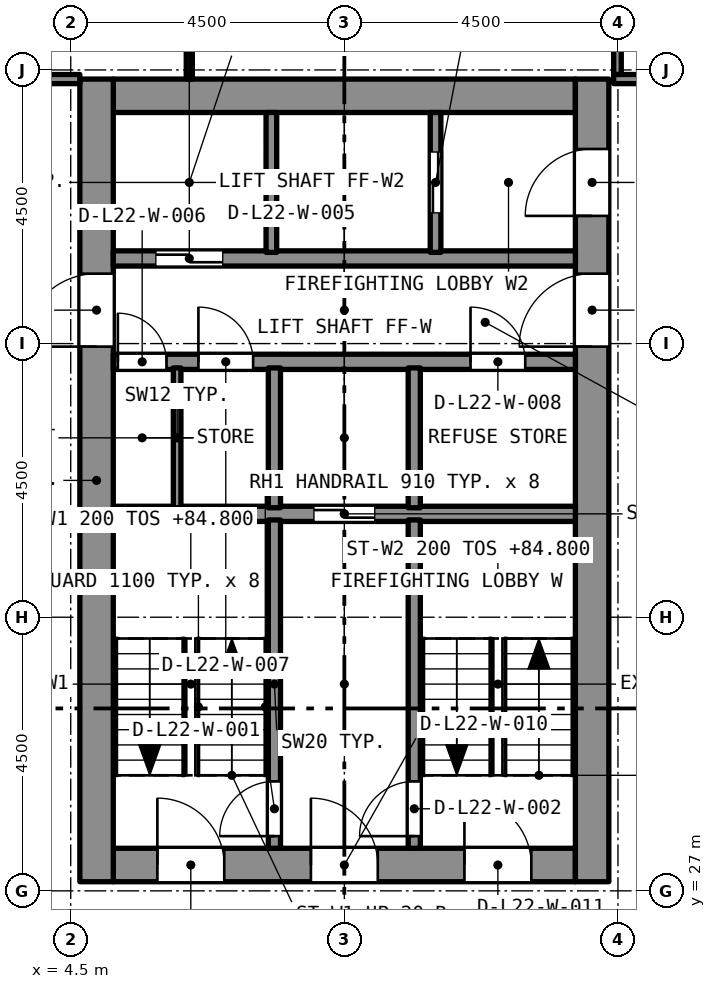
"""IFC4 building model, lengths in metres.
Left out: names, types, materials, properties, quantities, classifications, styles, units other than length and angle.
Written with IfcOpenShell. Run it as: python <this file> out.ifc"""

import sys

from ifc_helpers import new_model, si_unit, direction, frame, frame_2d, origin, place, context, subcontext, project, spatial, rectangle, extrude, element, fill, save


model = new_model("IFC4")
c1 = context("Model", 3, precision=1e-05, world=origin(), true_north=direction((0.0, 1.0)))
c2 = subcontext(c1, "Body", "Model", "MODEL_VIEW")
j1 = project(units=[si_unit("LENGTHUNIT", "METRE"), si_unit("PLANEANGLEUNIT", "RADIAN")], contexts=[c1])
p1 = place(None, origin())
s1 = spatial("IfcSite", under=j1, at=p1, CompositionType="ELEMENT")
p2 = place(p1, origin())
s2 = spatial("IfcBuilding", under=s1, at=p2, CompositionType="ELEMENT")
p3 = place(p2, frame((0.0, 0.0, 83.2)))
s3 = spatial("IfcBuildingStorey", under=s2, at=p3, CompositionType="ELEMENT", Elevation=83.2)
p4 = place(p3, frame((5.2, 27.425, 0.0), z_axis=(0.0, 0.0, 1.0), x_axis=(1.0, 0.0, 0.0)))
e1 = element("IfcWall", 1, at=p4, inside=s3, PredefinedType="SOLIDWALL", context=c2, shape_type="SweptSolid", body=[
    extrude(rectangle(XDim=7.6, YDim=0.55, at=frame_2d((3.8, 0.0))), origin(), (0.0, 0.0, 1.0), 3.2),
])
p5 = place(p4, frame((0.725, 0.0, 0.0)))
e2 = element("IfcOpeningElement", 2, at=p5, cuts=e1, PredefinedType="OPENING", context=c2, shape_type="SweptSolid", body=[
    extrude(rectangle(XDim=1.1, YDim=2.1, at=frame_2d((0.55, 1.05))), frame((0.0, 0.285, 0.0), z_axis=(0.0, -1.0, 0.0), x_axis=(1.0, 0.0, 0.0)), (0.0, 0.0, 1.0), 0.57),
])
p6 = place(p4, frame((3.25, 0.0, 0.0)))
e3 = element("IfcOpeningElement", 3, at=p6, cuts=e1, PredefinedType="OPENING", context=c2, shape_type="SweptSolid", body=[
    extrude(rectangle(XDim=1.1, YDim=2.1, at=frame_2d((0.55, 1.05))), frame((0.0, 0.285, 0.0), z_axis=(0.0, -1.0, 0.0), x_axis=(1.0, 0.0, 0.0)), (0.0, 0.0, 1.0), 0.57),
])
p7 = place(p4, frame((5.775, 0.0, 0.0)))
e4 = element("IfcOpeningElement", 4, at=p7, cuts=e1, PredefinedType="OPENING", context=c2, shape_type="SweptSolid", body=[
    extrude(rectangle(XDim=1.1, YDim=2.1, at=frame_2d((0.55, 1.05))), frame((0.0, 0.285, 0.0), z_axis=(0.0, -1.0, 0.0), x_axis=(1.0, 0.0, 0.0)), (0.0, 0.0, 1.0), 0.57),
])
p8 = place(p3, frame((5.2, 40.075, 0.0), z_axis=(0.0, 0.0, 1.0), x_axis=(1.0, 0.0, 0.0)))
e5 = element("IfcWall", 5, at=p8, inside=s3, PredefinedType="SOLIDWALL", context=c2, shape_type="SweptSolid", body=[
    extrude(rectangle(XDim=7.6, YDim=0.55, at=frame_2d((3.8, 0.0))), origin(), (0.0, 0.0, 1.0), 3.2),
])
p9 = place(p3, frame((4.925, 27.15, 0.0), z_axis=(0.0, 0.0, 1.0), x_axis=(0.0, 1.0, 0.0)))
e6 = element("IfcWall", 6, at=p9, inside=s3, PredefinedType="SOLIDWALL", context=c2, shape_type="SweptSolid", body=[
    extrude(rectangle(XDim=13.2, YDim=0.55, at=frame_2d((6.6, 0.0))), origin(), (0.0, 0.0, 1.0), 3.2),
])
p10 = place(p9, frame((8.8, 0.0, 0.0)))
e7 = element("IfcOpeningElement", 7, at=p10, cuts=e6, PredefinedType="OPENING", context=c2, shape_type="SweptSolid", body=[
    extrude(rectangle(XDim=1.2, YDim=2.1, at=frame_2d((0.6, 1.05))), frame((0.0, 0.285, 0.0), z_axis=(0.0, -1.0, 0.0), x_axis=(1.0, 0.0, 0.0)), (0.0, 0.0, 1.0), 0.57),
])
p11 = place(p3, frame((13.075, 27.15, 0.0), z_axis=(0.0, 0.0, 1.0), x_axis=(0.0, 1.0, 0.0)))
e8 = element("IfcWall", 8, at=p11, inside=s3, PredefinedType="SOLIDWALL", context=c2, shape_type="SweptSolid", body=[
    extrude(rectangle(XDim=13.2, YDim=0.55, at=frame_2d((6.6, 0.0))), origin(), (0.0, 0.0, 1.0), 3.2),
])
p12 = place(p11, frame((10.95, 0.0, 0.0)))
e9 = element("IfcOpeningElement", 9, at=p12, cuts=e8, PredefinedType="OPENING", context=c2, shape_type="SweptSolid", body=[
    extrude(rectangle(XDim=1.1, YDim=2.1, at=frame_2d((0.55, 1.05))), frame((0.0, 0.285, 0.0), z_axis=(0.0, -1.0, 0.0), x_axis=(1.0, 0.0, 0.0)), (0.0, 0.0, 1.0), 0.57),
])
p13 = place(p11, frame((8.8, 0.0, 0.0)))
e10 = element("IfcOpeningElement", 10, at=p13, cuts=e8, PredefinedType="OPENING", context=c2, shape_type="SweptSolid", body=[
    extrude(rectangle(XDim=1.2, YDim=2.1, at=frame_2d((0.6, 1.05))), frame((0.0, 0.285, 0.0), z_axis=(0.0, -1.0, 0.0), x_axis=(1.0, 0.0, 0.0)), (0.0, 0.0, 1.0), 0.57),
])
p14 = place(p3, frame((13.492, 40.425, 0.0), z_axis=(0.0, 0.0, 1.0), x_axis=(0.0, 1.0, 0.0)))
e11 = element("IfcWall", 11, at=p14, inside=s3, PredefinedType="PARTITIONING", context=c2, shape_type="SweptSolid", body=[
    extrude(rectangle(XDim=3.133, YDim=0.125, at=frame_2d((1.566, 0.0))), origin(), (0.0, 0.0, 1.0), 2.9),
])
p15 = place(p3, frame((13.429, 40.35, 0.0), z_axis=(0.0, 0.0, 1.0), x_axis=(1.0, 0.0, 0.0)))
e12 = element("IfcWall", 12, at=p15, inside=s3, PredefinedType="PARTITIONING", context=c2, shape_type="SweptSolid", body=[
    extrude(rectangle(XDim=3.996, YDim=0.15, at=frame_2d((1.998, 0.0))), origin(), (0.0, 0.0, 1.0), 2.9),
])
p16 = place(p3, frame((6.45, 40.35, 0.0), z_axis=(0.0, 0.0, 1.0), x_axis=(0.0, 1.0, 0.0)))
e13 = element("IfcWall", 13, at=p16, inside=s3, PredefinedType="PARTITIONING", context=c2, shape_type="SweptSolid", body=[
    extrude(rectangle(XDim=3.22, YDim=0.1, at=frame_2d((1.61, 0.0))), origin(), (0.0, 0.0, 1.0), 2.9),
])
p17 = place(p3, frame((0.575, 40.35, 0.0), z_axis=(0.0, 0.0, 1.0), x_axis=(1.0, 0.0, 0.0)))
e14 = element("IfcWall", 14, at=p17, inside=s3, PredefinedType="PARTITIONING", context=c2, shape_type="SweptSolid", body=[
    extrude(rectangle(XDim=4.075, YDim=0.15, at=frame_2d((2.038, 0.0))), origin(), (0.0, 0.0, 1.0), 2.9),
])
p18 = place(p17, frame((1.175, 0.0, 0.0)))
e15 = element("IfcOpeningElement", 15, at=p18, cuts=e14, PredefinedType="OPENING", context=c2, shape_type="SweptSolid", body=[
    extrude(rectangle(XDim=1.0, YDim=2.1, at=frame_2d((0.5, 1.05))), frame((0.0, 0.085, 0.0), z_axis=(0.0, -1.0, 0.0), x_axis=(1.0, 0.0, 0.0)), (0.0, 0.0, 1.0), 0.17),
])
p19 = place(p3, frame((5.2, 33.2, 0.0), z_axis=(0.0, 0.0, 1.0), x_axis=(1.0, 0.0, 0.0)))
e16 = element("IfcWall", 16, at=p19, inside=s3, PredefinedType="SOLIDWALL", context=c2, shape_type="SweptSolid", body=[
    extrude(rectangle(XDim=7.6, YDim=0.25, at=frame_2d((3.8, 0.0))), origin(), (0.0, 0.0, 1.0), 2.9),
])
p20 = place(p19, frame((3.3, 0.0, 0.0)))
e17 = element("IfcOpeningElement", 17, at=p20, cuts=e16, PredefinedType="OPENING", context=c2, shape_type="SweptSolid", body=[
    extrude(rectangle(XDim=1.0, YDim=2.1, at=frame_2d((0.5, 1.05))), frame((0.0, 0.135, 0.0), z_axis=(0.0, -1.0, 0.0), x_axis=(1.0, 0.0, 0.0)), (0.0, 0.0, 1.0), 0.27),
])
p21 = place(p3, frame((5.2, 35.7, 0.0), z_axis=(0.0, 0.0, 1.0), x_axis=(1.0, 0.0, 0.0)))
e18 = element("IfcWall", 18, at=p21, inside=s3, PredefinedType="SOLIDWALL", context=c2, shape_type="SweptSolid", body=[
    extrude(rectangle(XDim=7.6, YDim=0.25, at=frame_2d((3.8, 0.0))), origin(), (0.0, 0.0, 1.0), 2.9),
])
p22 = place(p21, frame((0.075, 0.0, 0.0)))
e19 = element("IfcOpeningElement", 19, at=p22, cuts=e18, PredefinedType="OPENING", context=c2, shape_type="SweptSolid", body=[
    extrude(rectangle(XDim=0.8, YDim=2.1, at=frame_2d((0.4, 1.05))), frame((0.0, 0.135, 0.0), z_axis=(0.0, -1.0, 0.0), x_axis=(1.0, 0.0, 0.0)), (0.0, 0.0, 1.0), 0.27),
])
p23 = place(p21, frame((1.4, 0.0, 0.0)))
e20 = element("IfcOpeningElement", 20, at=p23, cuts=e18, PredefinedType="OPENING", context=c2, shape_type="SweptSolid", body=[
    extrude(rectangle(XDim=0.9, YDim=2.1, at=frame_2d((0.45, 1.05))), frame((0.0, 0.135, 0.0), z_axis=(0.0, -1.0, 0.0), x_axis=(1.0, 0.0, 0.0)), (0.0, 0.0, 1.0), 0.27),
])
p24 = place(p21, frame((5.875, 0.0, 0.0)))
e21 = element("IfcOpeningElement", 21, at=p24, cuts=e18, PredefinedType="OPENING", context=c2, shape_type="SweptSolid", body=[
    extrude(rectangle(XDim=0.9, YDim=2.1, at=frame_2d((0.45, 1.05))), frame((0.0, 0.135, 0.0), z_axis=(0.0, -1.0, 0.0), x_axis=(1.0, 0.0, 0.0)), (0.0, 0.0, 1.0), 0.27),
])
p25 = place(p3, frame((5.2, 37.4, 0.0), z_axis=(0.0, 0.0, 1.0), x_axis=(1.0, 0.0, 0.0)))
e22 = element("IfcWall", 22, at=p25, inside=s3, PredefinedType="SOLIDWALL", context=c2, shape_type="SweptSolid", body=[
    extrude(rectangle(XDim=7.6, YDim=0.25, at=frame_2d((3.8, 0.0))), origin(), (0.0, 0.0, 1.0), 2.9),
])
p26 = place(p25, frame((0.7, 0.0, 0.0)))
e23 = element("IfcOpeningElement", 23, at=p26, cuts=e22, PredefinedType="OPENING", context=c2, shape_type="SweptSolid", body=[
    extrude(rectangle(XDim=1.1, YDim=2.4, at=frame_2d((0.55, 1.2))), frame((0.0, 0.135, 0.0), z_axis=(0.0, -1.0, 0.0), x_axis=(1.0, 0.0, 0.0)), (0.0, 0.0, 1.0), 0.27),
])
p27 = place(p3, frame((7.85, 27.7, 0.0), z_axis=(0.0, 0.0, 1.0), x_axis=(0.0, 1.0, 0.0)))
e24 = element("IfcWall", 24, at=p27, inside=s3, PredefinedType="SOLIDWALL", context=c2, shape_type="SweptSolid", body=[
    extrude(rectangle(XDim=5.4, YDim=0.2, at=frame_2d((2.7, 0.0))), origin(), (0.0, 0.0, 1.0), 2.9),
])
p28 = place(p27, frame((0.2, 0.0, 0.0)))
e25 = element("IfcOpeningElement", 25, at=p28, cuts=e24, PredefinedType="OPENING", context=c2, shape_type="SweptSolid", body=[
    extrude(rectangle(XDim=0.9, YDim=2.1, at=frame_2d((0.45, 1.05))), frame((0.0, 0.11, 0.0), z_axis=(0.0, -1.0, 0.0), x_axis=(1.0, 0.0, 0.0)), (0.0, 0.0, 1.0), 0.22),
])
p29 = place(p3, frame((10.15, 27.7, 0.0), z_axis=(0.0, 0.0, 1.0), x_axis=(0.0, 1.0, 0.0)))
e26 = element("IfcWall", 26, at=p29, inside=s3, PredefinedType="SOLIDWALL", context=c2, shape_type="SweptSolid", body=[
    extrude(rectangle(XDim=5.4, YDim=0.2, at=frame_2d((2.7, 0.0))), origin(), (0.0, 0.0, 1.0), 2.9),
])
p30 = place(p29, frame((0.2, 0.0, 0.0)))
e27 = element("IfcOpeningElement", 27, at=p30, cuts=e26, PredefinedType="OPENING", context=c2, shape_type="SweptSolid", body=[
    extrude(rectangle(XDim=0.9, YDim=2.1, at=frame_2d((0.45, 1.05))), frame((0.0, 0.11, 0.0), z_axis=(0.0, -1.0, 0.0), x_axis=(1.0, 0.0, 0.0)), (0.0, 0.0, 1.0), 0.22),
])
for number, where, z_axis, x_axis in (
    (28, (7.85, 33.3, 0.0), (0.0, 0.0, 1.0), (0.0, 1.0, 0.0)),
    (29, (10.15, 33.3, 0.0), (0.0, 0.0, 1.0), (0.0, 1.0, 0.0)),
):
    element("IfcWall", number, at=place(p3, frame(where, z_axis=z_axis, x_axis=x_axis)), inside=s3, PredefinedType="SOLIDWALL", context=c2, shape_type="SweptSolid", body=[
        extrude(rectangle(XDim=2.3, YDim=0.2, at=frame_2d((1.15, 0.0))), origin(), (0.0, 0.0, 1.0), 2.9),
    ])
p31 = place(p3, frame((7.8, 37.5, 0.0), z_axis=(0.0, 0.0, 1.0), x_axis=(0.0, 1.0, 0.0)))
e30 = element("IfcWall", 30, at=p31, inside=s3, PredefinedType="SOLIDWALL", context=c2, shape_type="SweptSolid", body=[
    extrude(rectangle(XDim=2.3, YDim=0.175, at=frame_2d((1.15, 0.0))), origin(), (0.0, 0.0, 1.0), 2.9),
])
p32 = place(p3, frame((10.5, 37.5, 0.0), z_axis=(0.0, 0.0, 1.0), x_axis=(0.0, 1.0, 0.0)))
e31 = element("IfcWall", 31, at=p32, inside=s3, PredefinedType="SOLIDWALL", context=c2, shape_type="SweptSolid", body=[
    extrude(rectangle(XDim=2.3, YDim=0.175, at=frame_2d((1.15, 0.0))), origin(), (0.0, 0.0, 1.0), 2.9),
])
p33 = place(p32, frame((0.65, 0.0, 0.0)))
e32 = element("IfcOpeningElement", 32, at=p33, cuts=e31, PredefinedType="OPENING", context=c2, shape_type="SweptSolid", body=[
    extrude(rectangle(XDim=1.0, YDim=2.1, at=frame_2d((0.5, 1.05))), frame((0.0, 0.097, 0.0), z_axis=(0.0, -1.0, 0.0), x_axis=(1.0, 0.0, 0.0)), (0.0, 0.0, 1.0), 0.195),
])
p34 = place(p3, frame((6.25, 33.3, 0.0), z_axis=(0.0, 0.0, 1.0), x_axis=(0.0, 1.0, 0.0)))
e33 = element("IfcWall", 33, at=p34, inside=s3, PredefinedType="PARTITIONING", context=c2, shape_type="SweptSolid", body=[
    extrude(rectangle(XDim=2.3, YDim=0.125, at=frame_2d((1.15, 0.0))), origin(), (0.0, 0.0, 1.0), 2.9),
])
p35 = place(p28, origin())
e34 = element("IfcDoor", 34, at=p35, inside=s3, OperationType="SINGLE_SWING_LEFT", PredefinedType="DOOR", context=c2, shape_type="SweptSolid", body=[
    extrude(rectangle(XDim=0.9, YDim=2.1, at=frame_2d((0.45, 1.05))), frame((0.0, 0.025, 0.0), z_axis=(0.0, -1.0, 0.0), x_axis=(1.0, 0.0, 0.0)), (0.0, 0.0, 1.0), 0.05),
])
fill(e25, e34)
p36 = place(p30, origin())
e35 = element("IfcDoor", 35, at=p36, inside=s3, OperationType="SINGLE_SWING_LEFT", PredefinedType="DOOR", context=c2, shape_type="SweptSolid", body=[
    extrude(rectangle(XDim=0.9, YDim=2.1, at=frame_2d((0.45, 1.05))), frame((0.0, 0.025, 0.0), z_axis=(0.0, -1.0, 0.0), x_axis=(1.0, 0.0, 0.0)), (0.0, 0.0, 1.0), 0.05),
])
fill(e27, e35)
p37 = place(p26, origin())
e36 = element("IfcDoor", 36, at=p37, inside=s3, OperationType="SLIDING_TO_LEFT", PredefinedType="DOOR", context=c2, shape_type="SweptSolid", body=[
    extrude(rectangle(XDim=1.1, YDim=2.4, at=frame_2d((0.55, 1.2))), frame((0.0, 0.025, 0.0), z_axis=(0.0, -1.0, 0.0), x_axis=(1.0, 0.0, 0.0)), (0.0, 0.0, 1.0), 0.05),
])
fill(e23, e36)
p38 = place(p33, origin())
e37 = element("IfcDoor", 37, at=p38, inside=s3, OperationType="SLIDING_TO_LEFT", PredefinedType="DOOR", context=c2, shape_type="SweptSolid", body=[
    extrude(rectangle(XDim=1.0, YDim=2.1, at=frame_2d((0.5, 1.05))), frame((0.0, 0.025, 0.0), z_axis=(0.0, -1.0, 0.0), x_axis=(1.0, 0.0, 0.0)), (0.0, 0.0, 1.0), 0.05),
])
fill(e32, e37)
p39 = place(p20, origin())
e38 = element("IfcDoor", 38, at=p39, inside=s3, OperationType="SLIDING_TO_LEFT", PredefinedType="DOOR", context=c2, shape_type="SweptSolid", body=[
    extrude(rectangle(XDim=1.0, YDim=2.1, at=frame_2d((0.5, 1.05))), frame((0.0, 0.025, 0.0), z_axis=(0.0, -1.0, 0.0), x_axis=(1.0, 0.0, 0.0)), (0.0, 0.0, 1.0), 0.05),
])
fill(e17, e38)
p40 = place(p22, origin())
e39 = element("IfcDoor", 39, at=p40, inside=s3, OperationType="SINGLE_SWING_LEFT", PredefinedType="DOOR", context=c2, shape_type="SweptSolid", body=[
    extrude(rectangle(XDim=0.8, YDim=2.1, at=frame_2d((0.4, 1.05))), frame((0.0, 0.025, 0.0), z_axis=(0.0, -1.0, 0.0), x_axis=(1.0, 0.0, 0.0)), (0.0, 0.0, 1.0), 0.05),
])
fill(e19, e39)
p41 = place(p23, origin())
e40 = element("IfcDoor", 40, at=p41, inside=s3, OperationType="SINGLE_SWING_LEFT", PredefinedType="DOOR", context=c2, shape_type="SweptSolid", body=[
    extrude(rectangle(XDim=0.9, YDim=2.1, at=frame_2d((0.45, 1.05))), frame((0.0, 0.025, 0.0), z_axis=(0.0, -1.0, 0.0), x_axis=(1.0, 0.0, 0.0)), (0.0, 0.0, 1.0), 0.05),
])
fill(e20, e40)
p42 = place(p24, origin())
e41 = element("IfcDoor", 41, at=p42, inside=s3, OperationType="SINGLE_SWING_LEFT", PredefinedType="DOOR", context=c2, shape_type="SweptSolid", body=[
    extrude(rectangle(XDim=0.9, YDim=2.1, at=frame_2d((0.45, 1.05))), frame((0.0, 0.025, 0.0), z_axis=(0.0, -1.0, 0.0), x_axis=(1.0, 0.0, 0.0)), (0.0, 0.0, 1.0), 0.05),
])
fill(e21, e41)
p43 = place(p5, origin())
e42 = element("IfcDoor", 42, at=p43, inside=s3, OperationType="SINGLE_SWING_LEFT", PredefinedType="DOOR", context=c2, shape_type="SweptSolid", body=[
    extrude(rectangle(XDim=1.1, YDim=2.1, at=frame_2d((0.55, 1.05))), frame((0.0, 0.025, 0.0), z_axis=(0.0, -1.0, 0.0), x_axis=(1.0, 0.0, 0.0)), (0.0, 0.0, 1.0), 0.05),
])
fill(e2, e42)
p44 = place(p6, origin())
e43 = element("IfcDoor", 43, at=p44, inside=s3, OperationType="SINGLE_SWING_LEFT", PredefinedType="DOOR", context=c2, shape_type="SweptSolid", body=[
    extrude(rectangle(XDim=1.1, YDim=2.1, at=frame_2d((0.55, 1.05))), frame((0.0, 0.025, 0.0), z_axis=(0.0, -1.0, 0.0), x_axis=(1.0, 0.0, 0.0)), (0.0, 0.0, 1.0), 0.05),
])
fill(e3, e43)
p45 = place(p7, origin())
e44 = element("IfcDoor", 44, at=p45, inside=s3, OperationType="SINGLE_SWING_LEFT", PredefinedType="DOOR", context=c2, shape_type="SweptSolid", body=[
    extrude(rectangle(XDim=1.1, YDim=2.1, at=frame_2d((0.55, 1.05))), frame((0.0, 0.025, 0.0), z_axis=(0.0, -1.0, 0.0), x_axis=(1.0, 0.0, 0.0)), (0.0, 0.0, 1.0), 0.05),
])
fill(e4, e44)
p46 = place(p12, origin())
e45 = element("IfcDoor", 45, at=p46, inside=s3, OperationType="SINGLE_SWING_LEFT", PredefinedType="DOOR", context=c2, shape_type="SweptSolid", body=[
    extrude(rectangle(XDim=1.1, YDim=2.1, at=frame_2d((0.55, 1.05))), frame((0.0, 0.025, 0.0), z_axis=(0.0, -1.0, 0.0), x_axis=(1.0, 0.0, 0.0)), (0.0, 0.0, 1.0), 0.05),
])
fill(e9, e45)
p47 = place(p10, origin())
e46 = element("IfcDoor", 46, at=p47, inside=s3, OperationType="SINGLE_SWING_LEFT", PredefinedType="DOOR", context=c2, shape_type="SweptSolid", body=[
    extrude(rectangle(XDim=1.2, YDim=2.1, at=frame_2d((0.6, 1.05))), frame((0.0, 0.025, 0.0), z_axis=(0.0, -1.0, 0.0), x_axis=(1.0, 0.0, 0.0)), (0.0, 0.0, 1.0), 0.05),
])
fill(e7, e46)
p48 = place(p13, origin())
e47 = element("IfcDoor", 47, at=p48, inside=s3, OperationType="SINGLE_SWING_LEFT", PredefinedType="DOOR", context=c2, shape_type="SweptSolid", body=[
    extrude(rectangle(XDim=1.2, YDim=2.1, at=frame_2d((0.6, 1.05))), frame((0.0, 0.025, 0.0), z_axis=(0.0, -1.0, 0.0), x_axis=(1.0, 0.0, 0.0)), (0.0, 0.0, 1.0), 0.05),
])
fill(e10, e47)
save(model, sys.argv[1])
